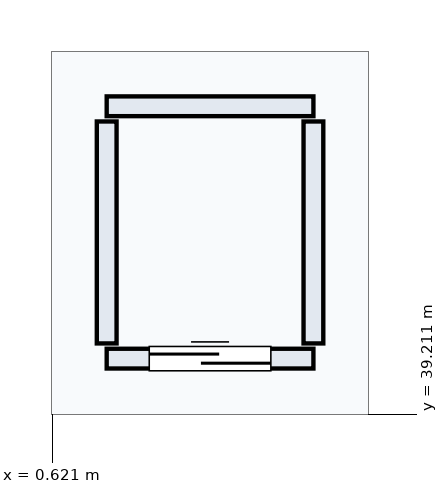
"""IFC4 building model, lengths in metres.
Left out: names, types, materials, properties, quantities, classifications, styles, units other than length and angle.
Written with IfcOpenShell. Run it as: python <this file> out.ifc"""

import sys

from ifc_helpers import new_model, si_unit, direction, frame, frame_2d, origin, place, context, subcontext, project, spatial, rectangle, extrude, element, fill, save


model = new_model("IFC4")
c1 = context("Model", 3, precision=1e-05, world=origin(), true_north=direction((0.0, 1.0)))
c2 = subcontext(c1, "Body", "Model", "MODEL_VIEW")
j1 = project(units=[si_unit("LENGTHUNIT", "METRE"), si_unit("PLANEANGLEUNIT", "RADIAN")], contexts=[c1])
p1 = place(None, origin())
s1 = spatial("IfcSite", under=j1, at=p1, CompositionType="ELEMENT")
p2 = place(p1, origin())
s2 = spatial("IfcBuilding", under=s1, at=p2, CompositionType="ELEMENT")
p3 = place(p2, frame((0.0, 0.0, -5.4)))
s3 = spatial("IfcBuildingStorey", under=s2, at=p3, CompositionType="ELEMENT", Elevation=-5.4)
p4 = place(p3, frame((1.34, 39.94, 0.0), z_axis=(0.0, 0.0, 1.0), x_axis=(1.0, 0.0, 0.0)))
e1 = element("IfcWall", 1, at=p4, inside=s3, PredefinedType="SOLIDWALL", context=c2, shape_type="SweptSolid", body=[
    extrude(rectangle(XDim=2.72, YDim=0.26, at=frame_2d((1.36, 0.0))), origin(), (0.0, 0.0, 1.0), 5.04),
])
p5 = place(p4, frame((0.56, 0.0, 0.0)))
e2 = element("IfcOpeningElement", 2, at=p5, cuts=e1, PredefinedType="OPENING", context=c2, shape_type="SweptSolid", body=[
    extrude(rectangle(XDim=1.6, YDim=2.35, at=frame_2d((0.8, 1.175))), frame((0.0, 0.14, 0.0), z_axis=(0.0, -1.0, 0.0), x_axis=(1.0, 0.0, 0.0)), (0.0, 0.0, 1.0), 0.28),
])
p6 = place(p3, frame((1.34, 43.26, 0.0), z_axis=(0.0, 0.0, 1.0), x_axis=(1.0, 0.0, 0.0)))
e3 = element("IfcWall", 3, at=p6, inside=s3, PredefinedType="SOLIDWALL", context=c2, shape_type="SweptSolid", body=[
    extrude(rectangle(XDim=2.72, YDim=0.26, at=frame_2d((1.36, 0.0))), origin(), (0.0, 0.0, 1.0), 5.04),
])
for number, where, z_axis, x_axis in (
    (4, (1.34, 40.14, 0.0), (0.0, 0.0, 1.0), (0.0, 1.0, 0.0)),
    (5, (4.06, 40.14, 0.0), (0.0, 0.0, 1.0), (0.0, 1.0, 0.0)),
):
    element("IfcWall", number, at=place(p3, frame(where, z_axis=z_axis, x_axis=x_axis)), inside=s3, PredefinedType="SOLIDWALL", context=c2, shape_type="SweptSolid", body=[
        extrude(rectangle(XDim=2.92, YDim=0.26, at=frame_2d((1.46, 0.0))), origin(), (0.0, 0.0, 1.0), 5.04),
    ])
p7 = place(p5, origin())
e6 = element("IfcDoor", 6, at=p7, inside=s3, OperationType="DOUBLE_DOOR_SLIDING", PredefinedType="DOOR", context=c2, shape_type="SweptSolid", body=[
    extrude(rectangle(XDim=1.6, YDim=2.35, at=frame_2d((0.8, 1.175))), frame((0.0, 0.025, 0.0), z_axis=(0.0, -1.0, 0.0), x_axis=(1.0, 0.0, 0.0)), (0.0, 0.0, 1.0), 0.05),
])
fill(e2, e6)
save(model, sys.argv[1])
